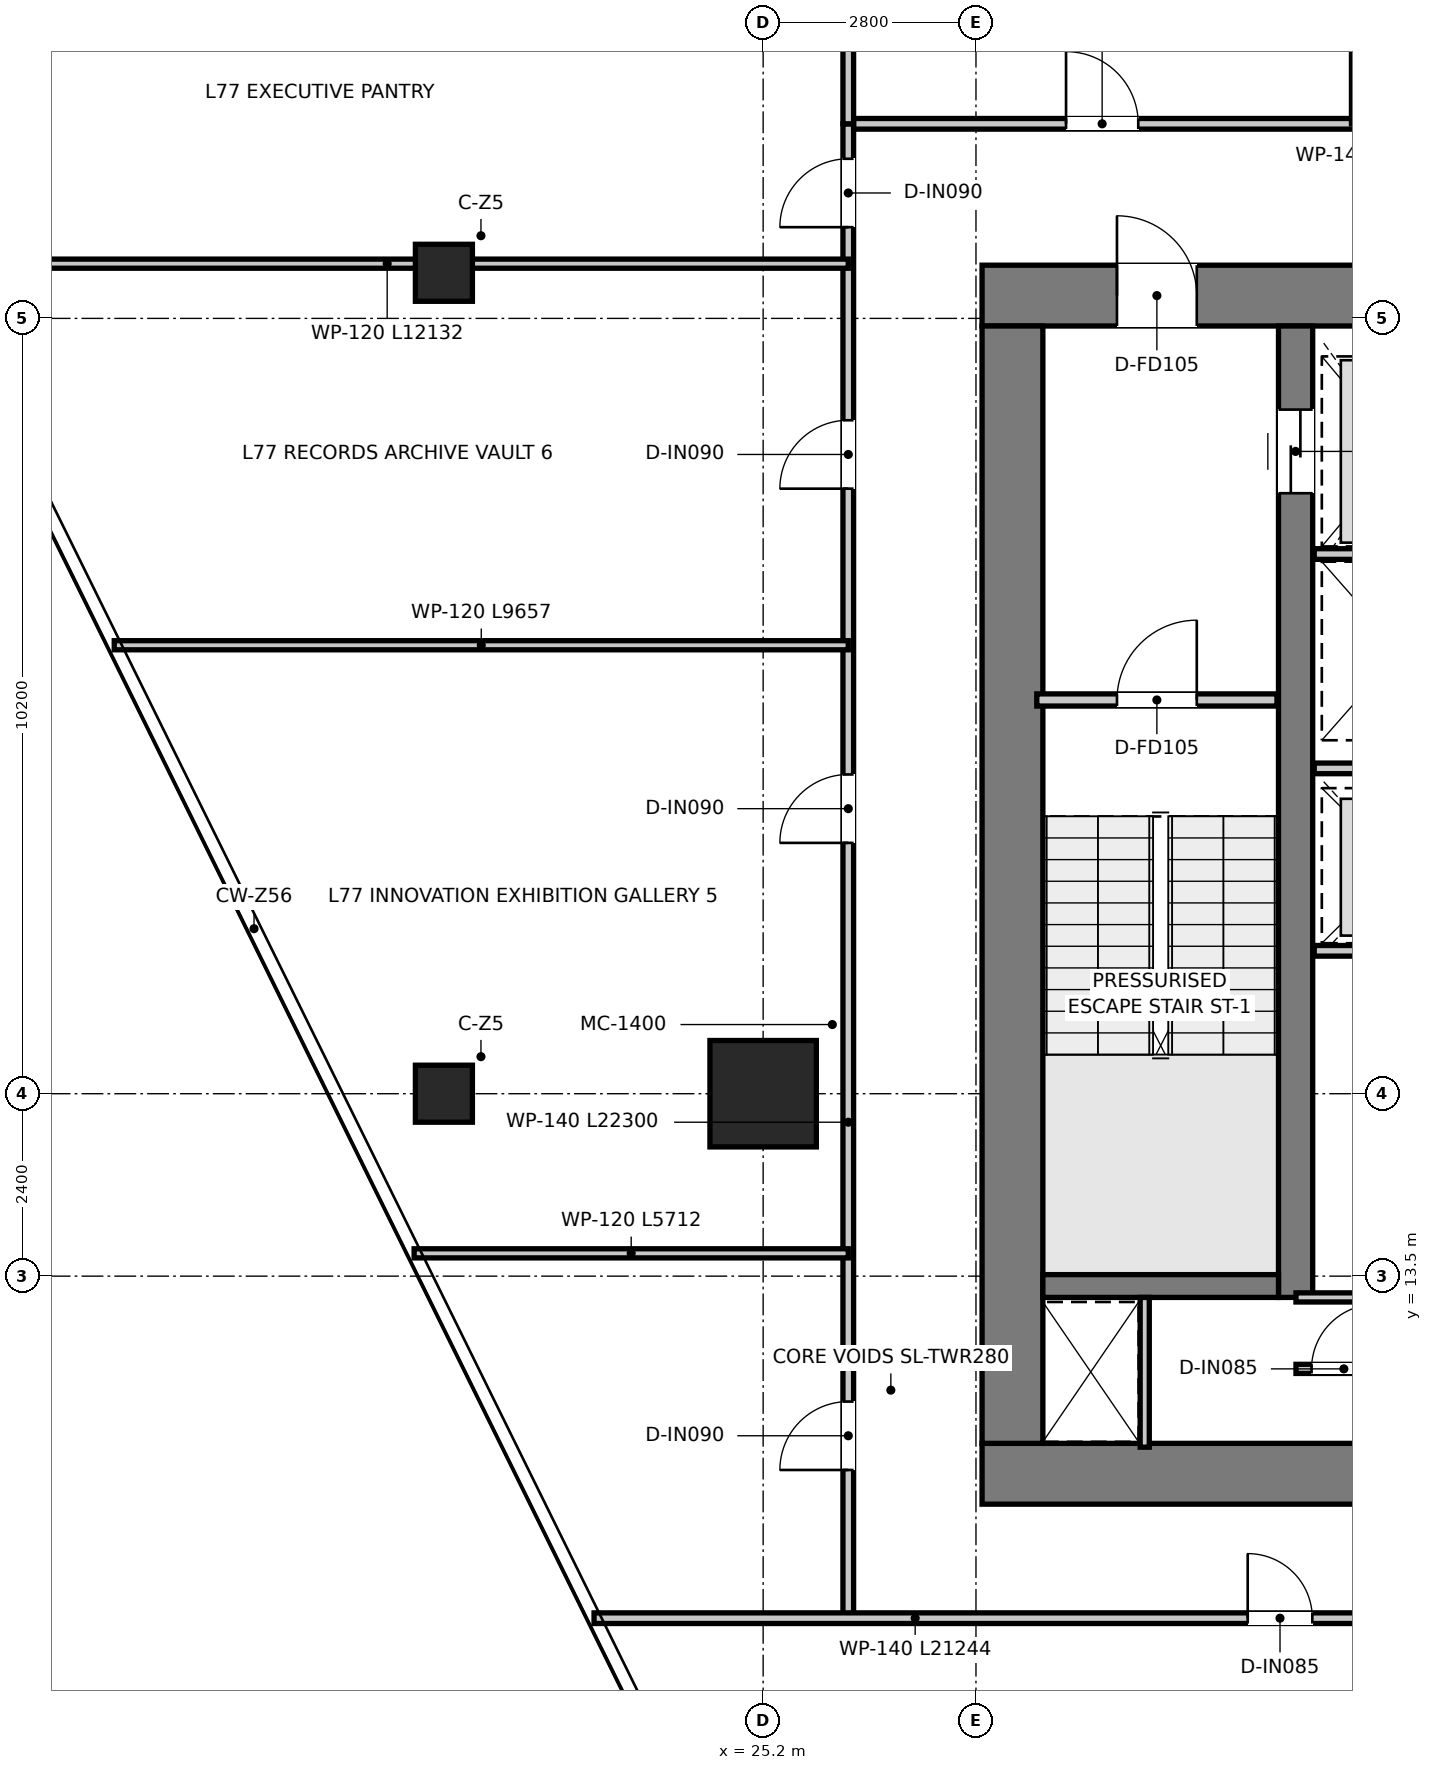
"""IFC4 building model, lengths in metres.
Left out: names, types, materials, properties, quantities, classifications, styles, units other than length and angle.
Written with IfcOpenShell. Run it as: python <this file> out.ifc"""

import sys

from ifc_helpers import new_model, si_unit, direction, frame, frame_2d, origin, origin_2d, place, context, subcontext, project, spatial, rectangle, extrude, source, transform, mapped, element, fill, save


model = new_model("IFC4")
c1 = context("Model", 3, precision=1e-05, world=origin(), true_north=direction((0.0, 1.0)))
c2 = subcontext(c1, "Body", "Model", "MODEL_VIEW")
j1 = project(units=[si_unit("LENGTHUNIT", "METRE"), si_unit("PLANEANGLEUNIT", "RADIAN")], contexts=[c1])
p1 = place(None, origin())
s1 = spatial("IfcSite", under=j1, at=p1, CompositionType="ELEMENT")
p2 = place(p1, origin())
s2 = spatial("IfcBuilding", under=s1, at=p2, CompositionType="ELEMENT")
p3 = place(p2, frame((0.0, 0.0, 314.8)))
s3 = spatial("IfcBuildingStorey", under=s2, at=p3, CompositionType="ELEMENT", Elevation=314.8)
p4 = place(p3, frame((28.08, 10.9, 0.0), z_axis=(0.0, 0.0, 1.0), x_axis=(1.0, 0.0, 0.0)))
e1 = element("IfcWall", 1, at=p4, inside=s3, PredefinedType="SHEAR", context=c2, shape_type="SweptSolid", body=[
    extrude(rectangle(XDim=15.84, YDim=0.8, at=frame_2d((7.92, 0.0))), origin(), (0.0, 0.0, 1.0), 3.95),
])
p5 = place(p3, frame((28.08, 26.4, 0.0), z_axis=(0.0, 0.0, 1.0), x_axis=(1.0, 0.0, 0.0)))
e2 = element("IfcWall", 2, at=p5, inside=s3, PredefinedType="SHEAR", context=c2, shape_type="SweptSolid", body=[
    extrude(rectangle(XDim=15.84, YDim=0.8, at=frame_2d((7.92, 0.0))), origin(), (0.0, 0.0, 1.0), 3.95),
])
p6 = place(p5, frame((7.22, 0.0, 0.0)))
e3 = element("IfcOpeningElement", 3, at=p6, cuts=e2, PredefinedType="OPENING", context=c2, shape_type="SweptSolid", body=[
    extrude(rectangle(XDim=1.4, YDim=2.2, at=frame_2d((0.7, 1.1))), frame((0.0, 0.41, 0.0), z_axis=(0.0, -1.0, 0.0), x_axis=(1.0, 0.0, 0.0)), (0.0, 0.0, 1.0), 0.82),
])
p7 = place(p5, frame((1.775, 0.0, 0.0)))
e4 = element("IfcOpeningElement", 4, at=p7, cuts=e2, PredefinedType="OPENING", context=c2, shape_type="SweptSolid", body=[
    extrude(rectangle(XDim=1.05, YDim=2.1, at=frame_2d((0.525, 1.05))), frame((0.0, 0.41, 0.0), z_axis=(0.0, -1.0, 0.0), x_axis=(1.0, 0.0, 0.0)), (0.0, 0.0, 1.0), 0.82),
])
p8 = place(p5, frame((13.015, 0.0, 0.0)))
e5 = element("IfcOpeningElement", 5, at=p8, cuts=e2, PredefinedType="OPENING", context=c2, shape_type="SweptSolid", body=[
    extrude(rectangle(XDim=1.05, YDim=2.1, at=frame_2d((0.525, 1.05))), frame((0.0, 0.41, 0.0), z_axis=(0.0, -1.0, 0.0), x_axis=(1.0, 0.0, 0.0)), (0.0, 0.0, 1.0), 0.82),
])
p9 = place(p3, frame((28.48, 11.3, 0.0), z_axis=(0.0, 0.0, 1.0), x_axis=(0.0, 1.0, 0.0)))
e6 = element("IfcWall", 6, at=p9, inside=s3, PredefinedType="SHEAR", context=c2, shape_type="SweptSolid", body=[
    extrude(rectangle(XDim=14.7, YDim=0.8, at=frame_2d((7.35, 0.0))), origin(), (0.0, 0.0, 1.0), 3.95),
])
p10 = place(p3, frame((32.205, 13.22, 0.0), z_axis=(0.0, 0.0, 1.0), x_axis=(0.0, 1.0, 0.0)))
e7 = element("IfcWall", 7, at=p10, inside=s3, PredefinedType="SHEAR", context=c2, shape_type="SweptSolid", body=[
    extrude(rectangle(XDim=12.78, YDim=0.45, at=frame_2d((6.39, 0.0))), origin(), (0.0, 0.0, 1.0), 3.95),
])
p11 = place(p10, frame((10.58, 0.0, 0.0)))
e8 = element("IfcOpeningElement", 8, at=p11, cuts=e7, PredefinedType="OPENING", context=c2, shape_type="SweptSolid", body=[
    extrude(rectangle(XDim=1.1, YDim=2.15, at=frame_2d((0.55, 1.075))), frame((0.0, 0.235, 0.0), z_axis=(0.0, -1.0, 0.0), x_axis=(1.0, 0.0, 0.0)), (0.0, 0.0, 1.0), 0.47),
])
p12 = place(p3, frame((28.88, 13.37, 0.0), z_axis=(0.0, 0.0, 1.0), x_axis=(1.0, 0.0, 0.0)))
e9 = element("IfcWall", 9, at=p12, inside=s3, PredefinedType="SHEAR", context=c2, shape_type="SweptSolid", body=[
    extrude(rectangle(XDim=3.1, YDim=0.3, at=frame_2d((1.55, 0.0))), origin(), (0.0, 0.0, 1.0), 3.95),
])
m1 = source(origin(), c2, "Body", "SweptSolid", [
    extrude(rectangle(XDim=1.4, YDim=1.4, at=origin_2d()), origin(), (0.0, 0.0, 1.0), 3.95),
])
p13 = place(p3, frame((25.2, 15.9, 0.0), z_axis=(0.0, 0.0, 1.0), x_axis=(1.0, 0.0, 0.0)))
e10 = element("IfcColumn", 10, at=p13, inside=s3, PredefinedType="USERDEFINED", context=c2, shape_type="MappedRepresentation", body=[
    mapped(m1, transform((0.0, 0.0, 0.0), x_axis=(1.0, 0.0, 0.0), y_axis=(0.0, 1.0, 0.0), z_axis=(0.0, 0.0, 1.0), scale=1.0)),
])
m2 = source(origin(), c2, "Body", "SweptSolid", [
    extrude(rectangle(XDim=0.75, YDim=0.75, at=origin_2d()), origin(), (0.0, 0.0, 1.0), 3.95),
])
for number, where, z_axis, x_axis in (
    (11, (21.0, 15.9, 0.0), (0.0, 0.0, 1.0), (1.0, 0.0, 0.0)),
    (12, (21.0, 26.7, 0.0), (0.0, 0.0, 1.0), (1.0, 0.0, 0.0)),
):
    element("IfcColumn", number, at=place(p3, frame(where, z_axis=z_axis, x_axis=x_axis)), inside=s3, PredefinedType="COLUMN", context=c2, shape_type="MappedRepresentation", body=[
        mapped(m2, transform((0.0, 0.0, 0.0), x_axis=(1.0, 0.0, 0.0), y_axis=(0.0, 1.0, 0.0), z_axis=(0.0, 0.0, 1.0), scale=1.0)),
    ])
p14 = place(p3, frame((28.8, 21.08, 0.0), z_axis=(0.0, 0.0, 1.0), x_axis=(1.0, 0.0, 0.0)))
e13 = element("IfcWall", 13, at=p14, inside=s3, PredefinedType="PARTITIONING", context=c2, shape_type="SweptSolid", body=[
    extrude(rectangle(XDim=3.16, YDim=0.16, at=frame_2d((1.58, 0.0))), origin(), (0.0, 0.0, 1.0), 3.59),
])
p15 = place(p14, frame((1.055, 0.0, 0.0)))
e14 = element("IfcOpeningElement", 14, at=p15, cuts=e13, PredefinedType="OPENING", context=c2, shape_type="SweptSolid", body=[
    extrude(rectangle(XDim=1.05, YDim=2.1, at=frame_2d((0.525, 1.05))), frame((0.0, 0.09, 0.0), z_axis=(0.0, -1.0, 0.0), x_axis=(1.0, 0.0, 0.0)), (0.0, 0.0, 1.0), 0.18),
])
p16 = place(p3, frame((32.45, 23.0, 0.0), z_axis=(0.0, 0.0, 1.0), x_axis=(1.0, 0.0, 0.0)))
e15 = element("IfcWall", 15, at=p16, inside=s3, PredefinedType="PARTITIONING", context=c2, shape_type="SweptSolid", body=[
    extrude(rectangle(XDim=2.27, YDim=0.14, at=frame_2d((1.135, 0.0))), origin(), (0.0, 0.0, 1.0), 2.74),
])
for number, where, z_axis, x_axis in (
    (16, (32.45, 17.78, 0.0), (0.0, 0.0, 1.0), (1.0, 0.0, 0.0)),
    (17, (32.45, 20.18, 0.0), (0.0, 0.0, 1.0), (1.0, 0.0, 0.0)),
):
    element("IfcWall", number, at=place(p3, frame(where, z_axis=z_axis, x_axis=x_axis)), inside=s3, PredefinedType="PARTITIONING", context=c2, shape_type="SweptSolid", body=[
        extrude(rectangle(XDim=2.27, YDim=0.14, at=frame_2d((1.135, 0.0))), origin(), (0.0, 0.0, 1.0), 3.59),
    ])
p17 = place(p3, frame((30.22, 11.25, 0.0), z_axis=(0.0, 0.0, 1.0), x_axis=(0.0, 1.0, 0.0)))
e18 = element("IfcWall", 18, at=p17, inside=s3, PredefinedType="PARTITIONING", context=c2, shape_type="SweptSolid", body=[
    extrude(rectangle(XDim=1.97, YDim=0.12, at=frame_2d((0.985, 0.0))), origin(), (0.0, 0.0, 1.0), 3.59),
])
p18 = place(p3, frame((32.21, 13.22, 0.0), z_axis=(0.0, 0.0, 1.0), x_axis=(1.0, 0.0, 0.0)))
e19 = element("IfcWall", 19, at=p18, inside=s3, PredefinedType="PARTITIONING", context=c2, shape_type="SweptSolid", body=[
    extrude(rectangle(XDim=7.58, YDim=0.12, at=frame_2d((3.79, 0.0))), origin(), (0.0, 0.0, 1.0), 3.59),
])
p19 = place(p18, frame((3.365, 0.0, 0.0)))
e20 = element("IfcOpeningElement", 20, at=p19, cuts=e19, PredefinedType="OPENING", context=c2, shape_type="SweptSolid", body=[
    extrude(rectangle(XDim=0.85, YDim=2.1, at=frame_2d((0.425, 1.05))), frame((0.0, 0.07, 0.0), z_axis=(0.0, -1.0, 0.0), x_axis=(1.0, 0.0, 0.0)), (0.0, 0.0, 1.0), 0.14),
])
p20 = place(p3, frame((32.21, 12.28, 0.0), z_axis=(0.0, 0.0, 1.0), x_axis=(1.0, 0.0, 0.0)))
e21 = element("IfcWall", 21, at=p20, inside=s3, PredefinedType="PARTITIONING", context=c2, shape_type="SweptSolid", body=[
    extrude(rectangle(XDim=7.58, YDim=0.12, at=frame_2d((3.79, 0.0))), origin(), (0.0, 0.0, 1.0), 3.59),
])
p21 = place(p20, frame((0.205, 0.0, 0.0)))
e22 = element("IfcOpeningElement", 22, at=p21, cuts=e21, PredefinedType="OPENING", context=c2, shape_type="SweptSolid", body=[
    extrude(rectangle(XDim=0.85, YDim=2.1, at=frame_2d((0.425, 1.05))), frame((0.0, 0.07, 0.0), z_axis=(0.0, -1.0, 0.0), x_axis=(1.0, 0.0, 0.0)), (0.0, 0.0, 1.0), 0.14),
])
p22 = place(p20, frame((2.095, 0.0, 0.0)))
e23 = element("IfcOpeningElement", 23, at=p22, cuts=e21, PredefinedType="OPENING", context=c2, shape_type="SweptSolid", body=[
    extrude(rectangle(XDim=0.85, YDim=2.1, at=frame_2d((0.425, 1.05))), frame((0.0, 0.07, 0.0), z_axis=(0.0, -1.0, 0.0), x_axis=(1.0, 0.0, 0.0)), (0.0, 0.0, 1.0), 0.14),
])
p23 = place(p20, frame((4.635, 0.0, 0.0)))
e24 = element("IfcOpeningElement", 24, at=p23, cuts=e21, PredefinedType="OPENING", context=c2, shape_type="SweptSolid", body=[
    extrude(rectangle(XDim=0.85, YDim=2.1, at=frame_2d((0.425, 1.05))), frame((0.0, 0.07, 0.0), z_axis=(0.0, -1.0, 0.0), x_axis=(1.0, 0.0, 0.0)), (0.0, 0.0, 1.0), 0.14),
])
p24 = place(p20, frame((6.525, 0.0, 0.0)))
e25 = element("IfcOpeningElement", 25, at=p24, cuts=e21, PredefinedType="OPENING", context=c2, shape_type="SweptSolid", body=[
    extrude(rectangle(XDim=0.85, YDim=2.1, at=frame_2d((0.425, 1.05))), frame((0.0, 0.07, 0.0), z_axis=(0.0, -1.0, 0.0), x_axis=(1.0, 0.0, 0.0)), (0.0, 0.0, 1.0), 0.14),
])
p25 = place(p3, frame((26.32, 28.66, 0.0), z_axis=(0.0, 0.0, 1.0), x_axis=(1.0, 0.0, 0.0)))
e26 = element("IfcWall", 26, at=p25, inside=s3, PredefinedType="PARTITIONING", context=c2, shape_type="SweptSolid", body=[
    extrude(rectangle(XDim=19.36, YDim=0.14, at=frame_2d((9.68, 0.0))), origin(), (0.0, 0.0, 1.0), 3.1),
])
p26 = place(p25, frame((2.865, 0.0, 0.0)))
e27 = element("IfcOpeningElement", 27, at=p26, cuts=e26, PredefinedType="OPENING", context=c2, shape_type="SweptSolid", body=[
    extrude(rectangle(XDim=0.95, YDim=2.1, at=frame_2d((0.475, 1.05))), frame((0.0, 0.08, 0.0), z_axis=(0.0, -1.0, 0.0), x_axis=(1.0, 0.0, 0.0)), (0.0, 0.0, 1.0), 0.16),
])
p27 = place(p25, frame((9.955, 0.0, 0.0)))
e28 = element("IfcOpeningElement", 28, at=p27, cuts=e26, PredefinedType="OPENING", context=c2, shape_type="SweptSolid", body=[
    extrude(rectangle(XDim=0.95, YDim=2.1, at=frame_2d((0.475, 1.05))), frame((0.0, 0.08, 0.0), z_axis=(0.0, -1.0, 0.0), x_axis=(1.0, 0.0, 0.0)), (0.0, 0.0, 1.0), 0.16),
])
p28 = place(p25, frame((16.295, 0.0, 0.0)))
e29 = element("IfcOpeningElement", 29, at=p28, cuts=e26, PredefinedType="OPENING", context=c2, shape_type="SweptSolid", body=[
    extrude(rectangle(XDim=0.95, YDim=2.1, at=frame_2d((0.475, 1.05))), frame((0.0, 0.08, 0.0), z_axis=(0.0, -1.0, 0.0), x_axis=(1.0, 0.0, 0.0)), (0.0, 0.0, 1.0), 0.16),
])
p29 = place(p3, frame((26.32, 9.0, 0.0), z_axis=(0.0, 0.0, 1.0), x_axis=(0.0, 1.0, 0.0)))
e30 = element("IfcWall", 30, at=p29, inside=s3, PredefinedType="PARTITIONING", context=c2, shape_type="SweptSolid", body=[
    extrude(rectangle(XDim=19.66, YDim=0.14, at=frame_2d((9.83, 0.0))), origin(), (0.0, 0.0, 1.0), 3.05),
])
p30 = place(p29, frame((18.3, 0.0, 0.0)))
e31 = element("IfcOpeningElement", 31, at=p30, cuts=e30, PredefinedType="OPENING", context=c2, shape_type="SweptSolid", body=[
    extrude(rectangle(XDim=0.9, YDim=2.1, at=frame_2d((0.45, 1.05))), frame((0.0, 0.08, 0.0), z_axis=(0.0, -1.0, 0.0), x_axis=(1.0, 0.0, 0.0)), (0.0, 0.0, 1.0), 0.16),
])
p31 = place(p29, frame((1.95, 0.0, 0.0)))
e32 = element("IfcOpeningElement", 32, at=p31, cuts=e30, PredefinedType="OPENING", context=c2, shape_type="SweptSolid", body=[
    extrude(rectangle(XDim=0.9, YDim=2.1, at=frame_2d((0.45, 1.05))), frame((0.0, 0.08, 0.0), z_axis=(0.0, -1.0, 0.0), x_axis=(1.0, 0.0, 0.0)), (0.0, 0.0, 1.0), 0.16),
])
p32 = place(p29, frame((10.2, 0.0, 0.0)))
e33 = element("IfcOpeningElement", 33, at=p32, cuts=e30, PredefinedType="OPENING", context=c2, shape_type="SweptSolid", body=[
    extrude(rectangle(XDim=0.9, YDim=2.1, at=frame_2d((0.45, 1.05))), frame((0.0, 0.08, 0.0), z_axis=(0.0, -1.0, 0.0), x_axis=(1.0, 0.0, 0.0)), (0.0, 0.0, 1.0), 0.16),
])
p33 = place(p29, frame((14.86, 0.0, 0.0)))
e34 = element("IfcOpeningElement", 34, at=p33, cuts=e30, PredefinedType="OPENING", context=c2, shape_type="SweptSolid", body=[
    extrude(rectangle(XDim=0.9, YDim=2.1, at=frame_2d((0.45, 1.05))), frame((0.0, 0.08, 0.0), z_axis=(0.0, -1.0, 0.0), x_axis=(1.0, 0.0, 0.0)), (0.0, 0.0, 1.0), 0.16),
])
p34 = place(p3, frame((22.975, 9.0, 0.0), z_axis=(0.0, 0.0, 1.0), x_axis=(1.0, 0.0, 0.0)))
e35 = element("IfcWall", 35, at=p34, inside=s3, PredefinedType="PARTITIONING", context=c2, shape_type="SweptSolid", body=[
    extrude(rectangle(XDim=21.244, YDim=0.14, at=frame_2d((10.622, 0.0))), origin(), (0.0, 0.0, 1.0), 3.59),
])
p35 = place(p34, frame((8.6, 0.0, 0.0)))
e36 = element("IfcOpeningElement", 36, at=p35, cuts=e35, PredefinedType="OPENING", context=c2, shape_type="SweptSolid", body=[
    extrude(rectangle(XDim=0.85, YDim=2.1, at=frame_2d((0.425, 1.05))), frame((0.0, 0.08, 0.0), z_axis=(0.0, -1.0, 0.0), x_axis=(1.0, 0.0, 0.0)), (0.0, 0.0, 1.0), 0.16),
])
p36 = place(p34, frame((16.6, 0.0, 0.0)))
e37 = element("IfcOpeningElement", 37, at=p36, cuts=e35, PredefinedType="OPENING", context=c2, shape_type="SweptSolid", body=[
    extrude(rectangle(XDim=0.85, YDim=2.1, at=frame_2d((0.425, 1.05))), frame((0.0, 0.08, 0.0), z_axis=(0.0, -1.0, 0.0), x_axis=(1.0, 0.0, 0.0)), (0.0, 0.0, 1.0), 0.16),
])
p37 = place(p3, frame((14.188, 26.82, 0.0), z_axis=(0.0, 0.0, 1.0), x_axis=(1.0, 0.0, 0.0)))
e38 = element("IfcWall", 38, at=p37, inside=s3, PredefinedType="PARTITIONING", context=c2, shape_type="SweptSolid", body=[
    extrude(rectangle(XDim=12.133, YDim=0.12, at=frame_2d((6.066, 0.0))), origin(), (0.0, 0.0, 1.0), 3.05),
])
p38 = place(p3, frame((26.32, 28.66, 0.0), z_axis=(0.0, 0.0, 1.0), x_axis=(0.0, 1.0, 0.0)))
e39 = element("IfcWall", 39, at=p38, inside=s3, PredefinedType="PARTITIONING", context=c2, shape_type="SweptSolid", body=[
    extrude(rectangle(XDim=2.64, YDim=0.14, at=frame_2d((1.32, 0.0))), origin(), (0.0, 0.0, 1.0), 3.35),
])
p39 = place(p3, frame((33.0, 28.66, 0.0), z_axis=(0.0, 0.0, 1.0), x_axis=(0.0, 1.0, 0.0)))
e40 = element("IfcWall", 40, at=p39, inside=s3, PredefinedType="PARTITIONING", context=c2, shape_type="SweptSolid", body=[
    extrude(rectangle(XDim=18.314, YDim=0.12, at=frame_2d((9.157, 0.0))), origin(), (0.0, 0.0, 1.0), 3.05),
])
p40 = place(p3, frame((20.608, 13.8, 0.0), z_axis=(0.0, 0.0, 1.0), x_axis=(1.0, 0.0, 0.0)))
e41 = element("IfcWall", 41, at=p40, inside=s3, PredefinedType="PARTITIONING", context=c2, shape_type="SweptSolid", body=[
    extrude(rectangle(XDim=5.712, YDim=0.12, at=frame_2d((2.856, 0.0))), origin(), (0.0, 0.0, 1.0), 3.1),
])
p41 = place(p3, frame((16.663, 21.8, 0.0), z_axis=(0.0, 0.0, 1.0), x_axis=(1.0, 0.0, 0.0)))
e42 = element("IfcWall", 42, at=p41, inside=s3, PredefinedType="PARTITIONING", context=c2, shape_type="SweptSolid", body=[
    extrude(rectangle(XDim=9.657, YDim=0.12, at=frame_2d((4.829, 0.0))), origin(), (0.0, 0.0, 1.0), 3.05),
])
p42 = place(p15, origin())
e43 = element("IfcDoor", 43, at=p42, inside=s3, OperationType="SINGLE_SWING_RIGHT", PredefinedType="DOOR", context=c2, shape_type="SweptSolid", body=[
    extrude(rectangle(XDim=1.05, YDim=2.1, at=frame_2d((0.525, 1.05))), frame((0.0, 0.025, 0.0), z_axis=(0.0, -1.0, 0.0), x_axis=(1.0, 0.0, 0.0)), (0.0, 0.0, 1.0), 0.05),
])
fill(e14, e43)
p43 = place(p7, origin())
e44 = element("IfcDoor", 44, at=p43, inside=s3, OperationType="SINGLE_SWING_LEFT", PredefinedType="DOOR", context=c2, shape_type="SweptSolid", body=[
    extrude(rectangle(XDim=1.05, YDim=2.1, at=frame_2d((0.525, 1.05))), frame((0.0, 0.025, 0.0), z_axis=(0.0, -1.0, 0.0), x_axis=(1.0, 0.0, 0.0)), (0.0, 0.0, 1.0), 0.05),
])
fill(e4, e44)
p44 = place(p11, origin())
e45 = element("IfcDoor", 45, at=p44, inside=s3, OperationType="DOUBLE_DOOR_SLIDING", PredefinedType="DOOR", context=c2, shape_type="SweptSolid", body=[
    extrude(rectangle(XDim=1.1, YDim=2.15, at=frame_2d((0.55, 1.075))), frame((0.0, 0.025, 0.0), z_axis=(0.0, -1.0, 0.0), x_axis=(1.0, 0.0, 0.0)), (0.0, 0.0, 1.0), 0.05),
])
fill(e8, e45)
p45 = place(p21, origin())
e46 = element("IfcDoor", 46, at=p45, inside=s3, OperationType="SINGLE_SWING_RIGHT", PredefinedType="DOOR", context=c2, shape_type="SweptSolid", body=[
    extrude(rectangle(XDim=0.85, YDim=2.1, at=frame_2d((0.425, 1.05))), frame((0.0, 0.025, 0.0), z_axis=(0.0, -1.0, 0.0), x_axis=(1.0, 0.0, 0.0)), (0.0, 0.0, 1.0), 0.05),
])
fill(e22, e46)
p46 = place(p30, origin())
e47 = element("IfcDoor", 47, at=p46, inside=s3, OperationType="SINGLE_SWING_LEFT", PredefinedType="DOOR", context=c2, shape_type="SweptSolid", body=[
    extrude(rectangle(XDim=0.9, YDim=2.1, at=frame_2d((0.45, 1.05))), frame((0.0, 0.025, 0.0), z_axis=(0.0, -1.0, 0.0), x_axis=(1.0, 0.0, 0.0)), (0.0, 0.0, 1.0), 0.05),
])
fill(e31, e47)
p47 = place(p26, origin())
e48 = element("IfcDoor", 48, at=p47, inside=s3, OperationType="SINGLE_SWING_LEFT", PredefinedType="DOOR", context=c2, shape_type="SweptSolid", body=[
    extrude(rectangle(XDim=0.95, YDim=2.1, at=frame_2d((0.475, 1.05))), frame((0.0, 0.025, 0.0), z_axis=(0.0, -1.0, 0.0), x_axis=(1.0, 0.0, 0.0)), (0.0, 0.0, 1.0), 0.05),
])
fill(e27, e48)
p48 = place(p31, origin())
e49 = element("IfcDoor", 49, at=p48, inside=s3, OperationType="SINGLE_SWING_LEFT", PredefinedType="DOOR", context=c2, shape_type="SweptSolid", body=[
    extrude(rectangle(XDim=0.9, YDim=2.1, at=frame_2d((0.45, 1.05))), frame((0.0, 0.025, 0.0), z_axis=(0.0, -1.0, 0.0), x_axis=(1.0, 0.0, 0.0)), (0.0, 0.0, 1.0), 0.05),
])
fill(e32, e49)
p49 = place(p32, origin())
e50 = element("IfcDoor", 50, at=p49, inside=s3, OperationType="SINGLE_SWING_LEFT", PredefinedType="DOOR", context=c2, shape_type="SweptSolid", body=[
    extrude(rectangle(XDim=0.9, YDim=2.1, at=frame_2d((0.45, 1.05))), frame((0.0, 0.025, 0.0), z_axis=(0.0, -1.0, 0.0), x_axis=(1.0, 0.0, 0.0)), (0.0, 0.0, 1.0), 0.05),
])
fill(e33, e50)
p50 = place(p33, origin())
e51 = element("IfcDoor", 51, at=p50, inside=s3, OperationType="SINGLE_SWING_LEFT", PredefinedType="DOOR", context=c2, shape_type="SweptSolid", body=[
    extrude(rectangle(XDim=0.9, YDim=2.1, at=frame_2d((0.45, 1.05))), frame((0.0, 0.025, 0.0), z_axis=(0.0, -1.0, 0.0), x_axis=(1.0, 0.0, 0.0)), (0.0, 0.0, 1.0), 0.05),
])
fill(e34, e51)
p51 = place(p35, origin())
e52 = element("IfcDoor", 52, at=p51, inside=s3, OperationType="SINGLE_SWING_LEFT", PredefinedType="DOOR", context=c2, shape_type="SweptSolid", body=[
    extrude(rectangle(XDim=0.85, YDim=2.1, at=frame_2d((0.425, 1.05))), frame((0.0, 0.025, 0.0), z_axis=(0.0, -1.0, 0.0), x_axis=(1.0, 0.0, 0.0)), (0.0, 0.0, 1.0), 0.05),
])
fill(e36, e52)
save(model, sys.argv[1])
